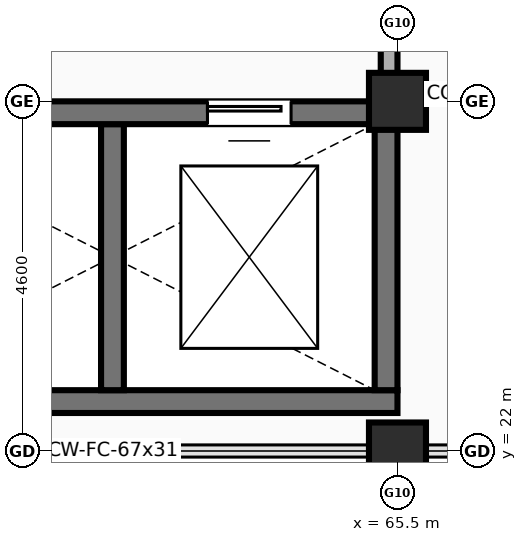
"""IFC4 building model, lengths in metres.
Left out: names, types, materials, properties, quantities, classifications, styles, units other than length and angle.
Written with IfcOpenShell. Run it as: python <this file> out.ifc"""

import sys

from ifc_helpers import new_model, si_unit, direction, frame, frame_2d, origin, origin_2d, place, context, subcontext, project, spatial, rectangle, extrude, element, fill, save


model = new_model("IFC4")
c1 = context("Model", 3, precision=1e-05, world=origin(), true_north=direction((0.0, 1.0)))
c2 = subcontext(c1, "Body", "Model", "MODEL_VIEW")
j1 = project(units=[si_unit("LENGTHUNIT", "METRE"), si_unit("PLANEANGLEUNIT", "RADIAN")], contexts=[c1])
p1 = place(None, origin())
s1 = spatial("IfcSite", under=j1, at=p1, CompositionType="ELEMENT")
p2 = place(p1, origin())
s2 = spatial("IfcBuilding", under=s1, at=p2, CompositionType="ELEMENT")
p3 = place(p2, frame((0.0, 0.0, 9.8)))
s3 = spatial("IfcBuildingStorey", under=s2, at=p3, CompositionType="ELEMENT", Elevation=9.8)
for number, where, z_axis, x_axis in (
    (1, (65.5, 22.0, 0.0), (0.0, 0.0, 1.0), (1.0, 0.0, 0.0)),
    (2, (65.5, 26.6, 0.0), (0.0, 0.0, 1.0), (1.0, 0.0, 0.0)),
):
    element("IfcColumn", number, at=place(p3, frame(where, z_axis=z_axis, x_axis=x_axis)), inside=s3, PredefinedType="COLUMN", context=c2, shape_type="SweptSolid", body=[
        extrude(rectangle(XDim=0.75, YDim=0.75, at=origin_2d()), origin(), (0.0, 0.0, 1.0), 4.4),
    ])
p4 = place(p3, frame((58.0, 22.65, 0.0), z_axis=(0.0, 0.0, 1.0), x_axis=(1.0, 0.0, 0.0)))
e3 = element("IfcWall", 3, at=p4, inside=s3, PredefinedType="SHEAR", context=c2, shape_type="SweptSolid", body=[
    extrude(rectangle(XDim=7.5, YDim=0.3, at=frame_2d((3.75, 0.0))), origin(), (0.0, 0.0, 1.0), 4.4),
])
for number, where, z_axis, x_axis in (
    (4, (65.35, 22.8, 0.0), (0.0, 0.0, 1.0), (0.0, 1.0, 0.0)),
    (5, (61.75, 22.8, 0.0), (0.0, 0.0, 1.0), (0.0, 1.0, 0.0)),
):
    element("IfcWall", number, at=place(p3, frame(where, z_axis=z_axis, x_axis=x_axis)), inside=s3, PredefinedType="SHEAR", context=c2, shape_type="SweptSolid", body=[
        extrude(rectangle(XDim=3.5, YDim=0.3, at=frame_2d((1.75, 0.0))), origin(), (0.0, 0.0, 1.0), 4.4),
    ])
p5 = place(p3, frame((58.0, 26.45, 0.0), z_axis=(0.0, 0.0, 1.0), x_axis=(1.0, 0.0, 0.0)))
e6 = element("IfcWall", 6, at=p5, inside=s3, PredefinedType="SHEAR", context=c2, shape_type="SweptSolid", body=[
    extrude(rectangle(XDim=7.5, YDim=0.3, at=frame_2d((3.75, 0.0))), origin(), (0.0, 0.0, 1.0), 4.4),
])
p6 = place(p5, frame((1.4, 0.0, 0.0)))
e7 = element("IfcOpeningElement", 7, at=p6, cuts=e6, PredefinedType="OPENING", context=c2, shape_type="SweptSolid", body=[
    extrude(rectangle(XDim=1.1, YDim=2.15, at=frame_2d((0.55, 1.075))), frame((0.0, 0.16, 0.0), z_axis=(0.0, -1.0, 0.0), x_axis=(1.0, 0.0, 0.0)), (0.0, 0.0, 1.0), 0.32),
])
p7 = place(p5, frame((5.0, 0.0, 0.0)))
e8 = element("IfcOpeningElement", 8, at=p7, cuts=e6, PredefinedType="OPENING", context=c2, shape_type="SweptSolid", body=[
    extrude(rectangle(XDim=1.1, YDim=2.15, at=frame_2d((0.55, 1.075))), frame((0.0, 0.16, 0.0), z_axis=(0.0, -1.0, 0.0), x_axis=(1.0, 0.0, 0.0)), (0.0, 0.0, 1.0), 0.32),
])
p8 = place(p3, frame((65.39, 26.75, 0.0), z_axis=(0.0, 0.0, 1.0), x_axis=(0.0, 1.0, 0.0)))
e9 = element("IfcWall", 9, at=p8, inside=s3, PredefinedType="SOLIDWALL", context=c2, shape_type="SweptSolid", body=[
    extrude(rectangle(XDim=3.83, YDim=0.22, at=frame_2d((1.915, 0.0))), origin(), (0.0, 0.0, 1.0), 3.3),
])
p9 = place(p7, origin())
e10 = element("IfcDoor", 10, at=p9, inside=s3, OperationType="SLIDING_TO_LEFT", PredefinedType="DOOR", context=c2, shape_type="SweptSolid", body=[
    extrude(rectangle(XDim=1.1, YDim=2.15, at=frame_2d((0.55, 1.075))), frame((0.0, 0.025, 0.0), z_axis=(0.0, -1.0, 0.0), x_axis=(1.0, 0.0, 0.0)), (0.0, 0.0, 1.0), 0.05),
])
fill(e8, e10)
save(model, sys.argv[1])
